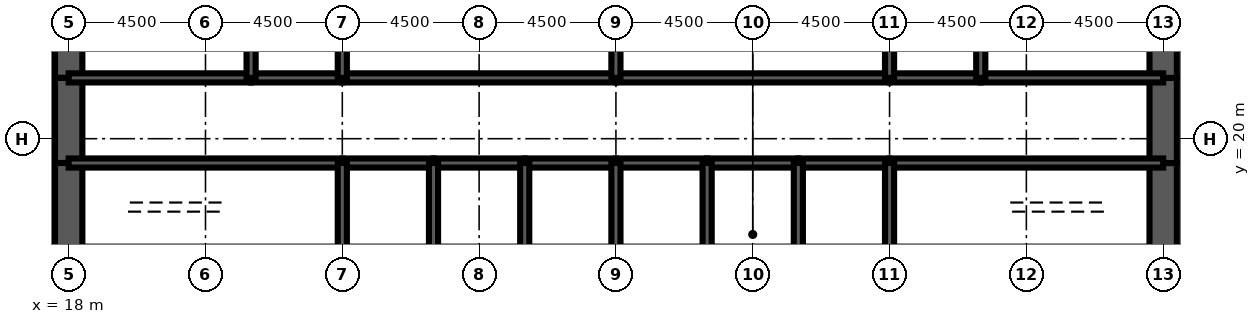
"""IFC4 building model, lengths in metres.
Left out: names, types, materials, properties, quantities, classifications, styles, units other than length and angle.
Written with IfcOpenShell. Run it as: python <this file> out.ifc"""

import sys

from ifc_helpers import new_model, si_unit, direction, frame, frame_2d, origin, place, context, subcontext, project, spatial, rectangle, extrude, element, fill, save


model = new_model("IFC4")
c1 = context("Model", 3, precision=1e-05, world=origin(), true_north=direction((0.0, 1.0)))
c2 = subcontext(c1, "Body", "Model", "MODEL_VIEW")
j1 = project(units=[si_unit("LENGTHUNIT", "METRE"), si_unit("PLANEANGLEUNIT", "RADIAN")], contexts=[c1])
p1 = place(None, origin())
s1 = spatial("IfcSite", under=j1, at=p1, CompositionType="ELEMENT")
p2 = place(p1, origin())
s2 = spatial("IfcBuilding", under=s1, at=p2, CompositionType="ELEMENT")
p3 = place(p2, frame((0.0, 0.0, 125.7)))
s3 = spatial("IfcBuildingStorey", under=s2, at=p3, CompositionType="ELEMENT", Elevation=125.7)
p4 = place(p3, frame((18.0, 26.0, 0.0), z_axis=(0.0, 0.0, 1.0), x_axis=(0.0, -1.0, 0.0)))
e1 = element("IfcWall", 1, at=p4, inside=s3, PredefinedType="SHEAR", context=c2, shape_type="SweptSolid", body=[
    extrude(rectangle(XDim=4.0, YDim=0.9, at=frame_2d((2.0, 0.0))), origin(), (0.0, 0.0, 1.0), 4.2),
])
p5 = place(p3, frame((18.0, 22.0, 0.0), z_axis=(0.0, 0.0, 1.0), x_axis=(0.0, -1.0, 0.0)))
e2 = element("IfcWall", 2, at=p5, inside=s3, PredefinedType="SHEAR", context=c2, shape_type="SweptSolid", body=[
    extrude(rectangle(XDim=2.8, YDim=0.9, at=frame_2d((1.4, 0.0))), origin(), (0.0, 0.0, 1.0), 4.2),
])
p6 = place(p5, frame((0.6, 0.0, 0.0)))
e3 = element("IfcOpeningElement", 3, at=p6, cuts=e2, PredefinedType="OPENING", context=c2, shape_type="SweptSolid", body=[
    extrude(rectangle(XDim=1.8, YDim=2.1, at=frame_2d((0.9, 1.05))), frame((0.0, 0.46, 0.0), z_axis=(0.0, -1.0, 0.0), x_axis=(1.0, 0.0, 0.0)), (0.0, 0.0, 1.0), 0.92),
])
for number, where, z_axis, x_axis in (
    (4, (18.0, 19.2, 0.0), (0.0, 0.0, 1.0), (0.0, -1.0, 0.0)),
    (5, (54.0, 16.0, 0.0), (0.0, 0.0, 1.0), (0.0, 1.0, 0.0)),
):
    element("IfcWall", number, at=place(p3, frame(where, z_axis=z_axis, x_axis=x_axis)), inside=s3, PredefinedType="SHEAR", context=c2, shape_type="SweptSolid", body=[
        extrude(rectangle(XDim=3.2, YDim=0.9, at=frame_2d((1.6, 0.0))), origin(), (0.0, 0.0, 1.0), 4.2),
    ])
p7 = place(p3, frame((54.0, 19.2, 0.0), z_axis=(0.0, 0.0, 1.0), x_axis=(0.0, 1.0, 0.0)))
e6 = element("IfcWall", 6, at=p7, inside=s3, PredefinedType="SHEAR", context=c2, shape_type="SweptSolid", body=[
    extrude(rectangle(XDim=2.8, YDim=0.9, at=frame_2d((1.4, 0.0))), origin(), (0.0, 0.0, 1.0), 4.2),
])
p8 = place(p7, frame((0.4, 0.0, 0.0)))
e7 = element("IfcOpeningElement", 7, at=p8, cuts=e6, PredefinedType="OPENING", context=c2, shape_type="SweptSolid", body=[
    extrude(rectangle(XDim=1.8, YDim=2.1, at=frame_2d((0.9, 1.05))), frame((0.0, 0.46, 0.0), z_axis=(0.0, -1.0, 0.0), x_axis=(1.0, 0.0, 0.0)), (0.0, 0.0, 1.0), 0.92),
])
p9 = place(p3, frame((54.0, 22.0, 0.0), z_axis=(0.0, 0.0, 1.0), x_axis=(0.0, 1.0, 0.0)))
e8 = element("IfcWall", 8, at=p9, inside=s3, PredefinedType="SHEAR", context=c2, shape_type="SweptSolid", body=[
    extrude(rectangle(XDim=4.0, YDim=0.9, at=frame_2d((2.0, 0.0))), origin(), (0.0, 0.0, 1.0), 4.2),
])
p10 = place(p3, frame((18.0, 19.2, 0.0), z_axis=(0.0, 0.0, 1.0), x_axis=(1.0, 0.0, 0.0)))
e9 = element("IfcWall", 9, at=p10, inside=s3, PredefinedType="SOLIDWALL", context=c2, shape_type="SweptSolid", body=[
    extrude(rectangle(XDim=9.0, YDim=0.3, at=frame_2d((4.5, 0.0))), origin(), (0.0, 0.0, 1.0), 4.2),
])
p11 = place(p10, frame((0.65, 0.0, 0.0)))
e10 = element("IfcOpeningElement", 10, at=p11, cuts=e9, PredefinedType="OPENING", context=c2, shape_type="SweptSolid", body=[
    extrude(rectangle(XDim=1.0, YDim=2.1, at=frame_2d((0.5, 1.05))), frame((0.0, 0.16, 0.0), z_axis=(0.0, -1.0, 0.0), x_axis=(1.0, 0.0, 0.0)), (0.0, 0.0, 1.0), 0.32),
])
p12 = place(p3, frame((27.0, 19.2, 0.0), z_axis=(0.0, 0.0, 1.0), x_axis=(1.0, 0.0, 0.0)))
e11 = element("IfcWall", 11, at=p12, inside=s3, PredefinedType="SOLIDWALL", context=c2, shape_type="SweptSolid", body=[
    extrude(rectangle(XDim=3.0, YDim=0.3, at=frame_2d((1.5, 0.0))), origin(), (0.0, 0.0, 1.0), 4.2),
])
p13 = place(p12, frame((0.95, 0.0, 0.0)))
e12 = element("IfcOpeningElement", 12, at=p13, cuts=e11, PredefinedType="OPENING", context=c2, shape_type="SweptSolid", body=[
    extrude(rectangle(XDim=1.1, YDim=2.2, at=frame_2d((0.55, 1.1))), frame((0.0, 0.16, 0.0), z_axis=(0.0, -1.0, 0.0), x_axis=(1.0, 0.0, 0.0)), (0.0, 0.0, 1.0), 0.32),
])
p14 = place(p3, frame((30.0, 19.2, 0.0), z_axis=(0.0, 0.0, 1.0), x_axis=(1.0, 0.0, 0.0)))
e13 = element("IfcWall", 13, at=p14, inside=s3, PredefinedType="SOLIDWALL", context=c2, shape_type="SweptSolid", body=[
    extrude(rectangle(XDim=3.0, YDim=0.3, at=frame_2d((1.5, 0.0))), origin(), (0.0, 0.0, 1.0), 4.2),
])
p15 = place(p14, frame((0.95, 0.0, 0.0)))
e14 = element("IfcOpeningElement", 14, at=p15, cuts=e13, PredefinedType="OPENING", context=c2, shape_type="SweptSolid", body=[
    extrude(rectangle(XDim=1.1, YDim=2.2, at=frame_2d((0.55, 1.1))), frame((0.0, 0.16, 0.0), z_axis=(0.0, -1.0, 0.0), x_axis=(1.0, 0.0, 0.0)), (0.0, 0.0, 1.0), 0.32),
])
p16 = place(p3, frame((33.0, 19.2, 0.0), z_axis=(0.0, 0.0, 1.0), x_axis=(1.0, 0.0, 0.0)))
e15 = element("IfcWall", 15, at=p16, inside=s3, PredefinedType="SOLIDWALL", context=c2, shape_type="SweptSolid", body=[
    extrude(rectangle(XDim=3.0, YDim=0.3, at=frame_2d((1.5, 0.0))), origin(), (0.0, 0.0, 1.0), 4.2),
])
p17 = place(p16, frame((0.95, 0.0, 0.0)))
e16 = element("IfcOpeningElement", 16, at=p17, cuts=e15, PredefinedType="OPENING", context=c2, shape_type="SweptSolid", body=[
    extrude(rectangle(XDim=1.1, YDim=2.2, at=frame_2d((0.55, 1.1))), frame((0.0, 0.16, 0.0), z_axis=(0.0, -1.0, 0.0), x_axis=(1.0, 0.0, 0.0)), (0.0, 0.0, 1.0), 0.32),
])
p18 = place(p3, frame((36.0, 19.2, 0.0), z_axis=(0.0, 0.0, 1.0), x_axis=(1.0, 0.0, 0.0)))
e17 = element("IfcWall", 17, at=p18, inside=s3, PredefinedType="SOLIDWALL", context=c2, shape_type="SweptSolid", body=[
    extrude(rectangle(XDim=3.0, YDim=0.3, at=frame_2d((1.5, 0.0))), origin(), (0.0, 0.0, 1.0), 4.2),
])
p19 = place(p18, frame((0.95, 0.0, 0.0)))
e18 = element("IfcOpeningElement", 18, at=p19, cuts=e17, PredefinedType="OPENING", context=c2, shape_type="SweptSolid", body=[
    extrude(rectangle(XDim=1.1, YDim=2.2, at=frame_2d((0.55, 1.1))), frame((0.0, 0.16, 0.0), z_axis=(0.0, -1.0, 0.0), x_axis=(1.0, 0.0, 0.0)), (0.0, 0.0, 1.0), 0.32),
])
p20 = place(p3, frame((39.0, 19.2, 0.0), z_axis=(0.0, 0.0, 1.0), x_axis=(1.0, 0.0, 0.0)))
e19 = element("IfcWall", 19, at=p20, inside=s3, PredefinedType="SOLIDWALL", context=c2, shape_type="SweptSolid", body=[
    extrude(rectangle(XDim=3.0, YDim=0.3, at=frame_2d((1.5, 0.0))), origin(), (0.0, 0.0, 1.0), 4.2),
])
p21 = place(p20, frame((1.0, 0.0, 0.0)))
e20 = element("IfcOpeningElement", 20, at=p21, cuts=e19, PredefinedType="OPENING", context=c2, shape_type="SweptSolid", body=[
    extrude(rectangle(XDim=1.0, YDim=2.1, at=frame_2d((0.5, 1.05))), frame((0.0, 0.16, 0.0), z_axis=(0.0, -1.0, 0.0), x_axis=(1.0, 0.0, 0.0)), (0.0, 0.0, 1.0), 0.32),
])
p22 = place(p3, frame((42.0, 19.2, 0.0), z_axis=(0.0, 0.0, 1.0), x_axis=(1.0, 0.0, 0.0)))
e21 = element("IfcWall", 21, at=p22, inside=s3, PredefinedType="SOLIDWALL", context=c2, shape_type="SweptSolid", body=[
    extrude(rectangle(XDim=3.0, YDim=0.3, at=frame_2d((1.5, 0.0))), origin(), (0.0, 0.0, 1.0), 4.2),
])
p23 = place(p3, frame((45.0, 19.2, 0.0), z_axis=(0.0, 0.0, 1.0), x_axis=(1.0, 0.0, 0.0)))
e22 = element("IfcWall", 22, at=p23, inside=s3, PredefinedType="SOLIDWALL", context=c2, shape_type="SweptSolid", body=[
    extrude(rectangle(XDim=9.0, YDim=0.3, at=frame_2d((4.5, 0.0))), origin(), (0.0, 0.0, 1.0), 4.2),
])
p24 = place(p23, frame((7.35, 0.0, 0.0)))
e23 = element("IfcOpeningElement", 23, at=p24, cuts=e22, PredefinedType="OPENING", context=c2, shape_type="SweptSolid", body=[
    extrude(rectangle(XDim=1.0, YDim=2.1, at=frame_2d((0.5, 1.05))), frame((0.0, 0.16, 0.0), z_axis=(0.0, -1.0, 0.0), x_axis=(1.0, 0.0, 0.0)), (0.0, 0.0, 1.0), 0.32),
])
p25 = place(p3, frame((18.0, 22.0, 0.0), z_axis=(0.0, 0.0, 1.0), x_axis=(1.0, 0.0, 0.0)))
e24 = element("IfcWall", 24, at=p25, inside=s3, PredefinedType="SOLIDWALL", context=c2, shape_type="SweptSolid", body=[
    extrude(rectangle(XDim=6.0, YDim=0.3, at=frame_2d((3.0, 0.0))), origin(), (0.0, 0.0, 1.0), 4.2),
])
p26 = place(p25, frame((4.4, 0.0, 0.0)))
e25 = element("IfcOpeningElement", 25, at=p26, cuts=e24, PredefinedType="OPENING", context=c2, shape_type="SweptSolid", body=[
    extrude(rectangle(XDim=1.0, YDim=2.1, at=frame_2d((0.5, 1.05))), frame((0.0, 0.16, 0.0), z_axis=(0.0, -1.0, 0.0), x_axis=(1.0, 0.0, 0.0)), (0.0, 0.0, 1.0), 0.32),
])
p27 = place(p25, frame((1.0, 0.0, 0.0)))
e26 = element("IfcOpeningElement", 26, at=p27, cuts=e24, PredefinedType="OPENING", context=c2, shape_type="SweptSolid", body=[
    extrude(rectangle(XDim=1.0, YDim=2.1, at=frame_2d((0.5, 1.05))), frame((0.0, 0.16, 0.0), z_axis=(0.0, -1.0, 0.0), x_axis=(1.0, 0.0, 0.0)), (0.0, 0.0, 1.0), 0.32),
])
p28 = place(p3, frame((24.0, 22.0, 0.0), z_axis=(0.0, 0.0, 1.0), x_axis=(1.0, 0.0, 0.0)))
e27 = element("IfcWall", 27, at=p28, inside=s3, PredefinedType="SOLIDWALL", context=c2, shape_type="SweptSolid", body=[
    extrude(rectangle(XDim=3.0, YDim=0.3, at=frame_2d((1.5, 0.0))), origin(), (0.0, 0.0, 1.0), 4.2),
])
p29 = place(p28, frame((1.0, 0.0, 0.0)))
e28 = element("IfcOpeningElement", 28, at=p29, cuts=e27, PredefinedType="OPENING", context=c2, shape_type="SweptSolid", body=[
    extrude(rectangle(XDim=1.0, YDim=2.1, at=frame_2d((0.5, 1.05))), frame((0.0, 0.16, 0.0), z_axis=(0.0, -1.0, 0.0), x_axis=(1.0, 0.0, 0.0)), (0.0, 0.0, 1.0), 0.32),
])
p30 = place(p3, frame((27.0, 22.0, 0.0), z_axis=(0.0, 0.0, 1.0), x_axis=(1.0, 0.0, 0.0)))
e29 = element("IfcWall", 29, at=p30, inside=s3, PredefinedType="SOLIDWALL", context=c2, shape_type="SweptSolid", body=[
    extrude(rectangle(XDim=9.0, YDim=0.3, at=frame_2d((4.5, 0.0))), origin(), (0.0, 0.0, 1.0), 4.2),
])
p31 = place(p30, frame((4.0, 0.0, 0.0)))
e30 = element("IfcOpeningElement", 30, at=p31, cuts=e29, PredefinedType="OPENING", context=c2, shape_type="SweptSolid", body=[
    extrude(rectangle(XDim=1.0, YDim=2.1, at=frame_2d((0.5, 1.05))), frame((0.0, 0.16, 0.0), z_axis=(0.0, -1.0, 0.0), x_axis=(1.0, 0.0, 0.0)), (0.0, 0.0, 1.0), 0.32),
])
p32 = place(p3, frame((36.0, 22.0, 0.0), z_axis=(0.0, 0.0, 1.0), x_axis=(1.0, 0.0, 0.0)))
e31 = element("IfcWall", 31, at=p32, inside=s3, PredefinedType="SOLIDWALL", context=c2, shape_type="SweptSolid", body=[
    extrude(rectangle(XDim=9.0, YDim=0.3, at=frame_2d((4.5, 0.0))), origin(), (0.0, 0.0, 1.0), 4.2),
])
p33 = place(p32, frame((4.0, 0.0, 0.0)))
e32 = element("IfcOpeningElement", 32, at=p33, cuts=e31, PredefinedType="OPENING", context=c2, shape_type="SweptSolid", body=[
    extrude(rectangle(XDim=1.0, YDim=2.1, at=frame_2d((0.5, 1.05))), frame((0.0, 0.16, 0.0), z_axis=(0.0, -1.0, 0.0), x_axis=(1.0, 0.0, 0.0)), (0.0, 0.0, 1.0), 0.32),
])
p34 = place(p3, frame((45.0, 22.0, 0.0), z_axis=(0.0, 0.0, 1.0), x_axis=(1.0, 0.0, 0.0)))
e33 = element("IfcWall", 33, at=p34, inside=s3, PredefinedType="SOLIDWALL", context=c2, shape_type="SweptSolid", body=[
    extrude(rectangle(XDim=3.0, YDim=0.3, at=frame_2d((1.5, 0.0))), origin(), (0.0, 0.0, 1.0), 4.2),
])
p35 = place(p34, frame((1.0, 0.0, 0.0)))
e34 = element("IfcOpeningElement", 34, at=p35, cuts=e33, PredefinedType="OPENING", context=c2, shape_type="SweptSolid", body=[
    extrude(rectangle(XDim=1.0, YDim=2.1, at=frame_2d((0.5, 1.05))), frame((0.0, 0.16, 0.0), z_axis=(0.0, -1.0, 0.0), x_axis=(1.0, 0.0, 0.0)), (0.0, 0.0, 1.0), 0.32),
])
p36 = place(p3, frame((48.0, 22.0, 0.0), z_axis=(0.0, 0.0, 1.0), x_axis=(1.0, 0.0, 0.0)))
e35 = element("IfcWall", 35, at=p36, inside=s3, PredefinedType="SOLIDWALL", context=c2, shape_type="SweptSolid", body=[
    extrude(rectangle(XDim=6.0, YDim=0.3, at=frame_2d((3.0, 0.0))), origin(), (0.0, 0.0, 1.0), 4.2),
])
p37 = place(p36, frame((2.0, 0.0, 0.0)))
e36 = element("IfcOpeningElement", 36, at=p37, cuts=e35, PredefinedType="OPENING", context=c2, shape_type="SweptSolid", body=[
    extrude(rectangle(XDim=1.0, YDim=2.1, at=frame_2d((0.5, 1.05))), frame((0.0, 0.16, 0.0), z_axis=(0.0, -1.0, 0.0), x_axis=(1.0, 0.0, 0.0)), (0.0, 0.0, 1.0), 0.32),
])
p38 = place(p36, frame((4.3, 0.0, 0.0)))
e37 = element("IfcOpeningElement", 37, at=p38, cuts=e35, PredefinedType="OPENING", context=c2, shape_type="SweptSolid", body=[
    extrude(rectangle(XDim=1.0, YDim=2.1, at=frame_2d((0.5, 1.05))), frame((0.0, 0.16, 0.0), z_axis=(0.0, -1.0, 0.0), x_axis=(1.0, 0.0, 0.0)), (0.0, 0.0, 1.0), 0.32),
])
for number, where, z_axis, x_axis in (
    (38, (27.0, 16.0, 0.0), (0.0, 0.0, 1.0), (0.0, 1.0, 0.0)),
    (39, (30.0, 16.0, 0.0), (0.0, 0.0, 1.0), (0.0, 1.0, 0.0)),
    (40, (33.0, 16.0, 0.0), (0.0, 0.0, 1.0), (0.0, 1.0, 0.0)),
    (41, (36.0, 16.0, 0.0), (0.0, 0.0, 1.0), (0.0, 1.0, 0.0)),
    (42, (39.0, 16.0, 0.0), (0.0, 0.0, 1.0), (0.0, 1.0, 0.0)),
    (43, (42.0, 16.0, 0.0), (0.0, 0.0, 1.0), (0.0, 1.0, 0.0)),
    (44, (45.0, 16.0, 0.0), (0.0, 0.0, 1.0), (0.0, 1.0, 0.0)),
):
    element("IfcWall", number, at=place(p3, frame(where, z_axis=z_axis, x_axis=x_axis)), inside=s3, PredefinedType="SOLIDWALL", context=c2, shape_type="SweptSolid", body=[
        extrude(rectangle(XDim=3.2, YDim=0.3, at=frame_2d((1.6, 0.0))), origin(), (0.0, 0.0, 1.0), 4.2),
    ])
for number, where, z_axis, x_axis in (
    (45, (24.0, 22.0, 0.0), (0.0, 0.0, 1.0), (0.0, 1.0, 0.0)),
    (46, (27.0, 22.0, 0.0), (0.0, 0.0, 1.0), (0.0, 1.0, 0.0)),
    (47, (36.0, 22.0, 0.0), (0.0, 0.0, 1.0), (0.0, 1.0, 0.0)),
    (48, (45.0, 22.0, 0.0), (0.0, 0.0, 1.0), (0.0, 1.0, 0.0)),
    (49, (48.0, 22.0, 0.0), (0.0, 0.0, 1.0), (0.0, 1.0, 0.0)),
):
    element("IfcWall", number, at=place(p3, frame(where, z_axis=z_axis, x_axis=x_axis)), inside=s3, PredefinedType="SOLIDWALL", context=c2, shape_type="SweptSolid", body=[
        extrude(rectangle(XDim=4.0, YDim=0.3, at=frame_2d((2.0, 0.0))), origin(), (0.0, 0.0, 1.0), 4.2),
    ])
p39 = place(p3, frame((39.15, 17.4, 0.0), z_axis=(0.0, 0.0, 1.0), x_axis=(1.0, 0.0, 0.0)))
e50 = element("IfcWall", 50, at=p39, inside=s3, PredefinedType="SOLIDWALL", context=c2, shape_type="SweptSolid", body=[
    extrude(rectangle(XDim=2.7, YDim=0.3, at=frame_2d((1.35, 0.0))), origin(), (0.0, 0.0, 1.0), 4.04),
])
p40 = place(p39, frame((0.85, 0.0, 0.0)))
e51 = element("IfcOpeningElement", 51, at=p40, cuts=e50, PredefinedType="OPENING", context=c2, shape_type="SweptSolid", body=[
    extrude(rectangle(XDim=1.0, YDim=2.1, at=frame_2d((0.5, 1.05))), frame((0.0, 0.16, 0.0), z_axis=(0.0, -1.0, 0.0), x_axis=(1.0, 0.0, 0.0)), (0.0, 0.0, 1.0), 0.32),
])
p41 = place(p3, frame((42.5, 22.15, 0.0), z_axis=(0.0, 0.0, 1.0), x_axis=(0.0, 1.0, 0.0)))
e52 = element("IfcWall", 52, at=p41, inside=s3, PredefinedType="PARTITIONING", context=c2, shape_type="SweptSolid", body=[
    extrude(rectangle(XDim=3.7, YDim=0.15, at=frame_2d((1.85, 0.0))), origin(), (0.0, 0.0, 1.0), 3.0),
])
p42 = place(p41, frame((2.2, 0.0, 0.0)))
e53 = element("IfcOpeningElement", 53, at=p42, cuts=e52, PredefinedType="OPENING", context=c2, shape_type="SweptSolid", body=[
    extrude(rectangle(XDim=1.0, YDim=2.1, at=frame_2d((0.5, 1.05))), frame((0.0, 0.085, 0.0), z_axis=(0.0, -1.0, 0.0), x_axis=(1.0, 0.0, 0.0)), (0.0, 0.0, 1.0), 0.17),
])
for number, where, z_axis, x_axis in (
    (54, (20.625, 22.15, 0.0), (0.0, 0.0, 1.0), (0.0, 1.0, 0.0)),
    (55, (51.975, 22.15, 0.0), (0.0, 0.0, 1.0), (0.0, 1.0, 0.0)),
):
    element("IfcWall", number, at=place(p3, frame(where, z_axis=z_axis, x_axis=x_axis)), inside=s3, PredefinedType="PARTITIONING", context=c2, shape_type="SweptSolid", body=[
        extrude(rectangle(XDim=3.7, YDim=0.15, at=frame_2d((1.85, 0.0))), origin(), (0.0, 0.0, 1.0), 3.0),
    ])
p43 = place(p40, origin())
e56 = element("IfcDoor", 56, at=p43, inside=s3, OperationType="SINGLE_SWING_LEFT", PredefinedType="DOOR", context=c2, shape_type="SweptSolid", body=[
    extrude(rectangle(XDim=1.0, YDim=2.1, at=frame_2d((0.5, 1.05))), frame((0.0, 0.025, 0.0), z_axis=(0.0, -1.0, 0.0), x_axis=(1.0, 0.0, 0.0)), (0.0, 0.0, 1.0), 0.05),
])
fill(e51, e56)
p44 = place(p13, origin())
e57 = element("IfcDoor", 57, at=p44, inside=s3, OperationType="DOUBLE_DOOR_SLIDING", PredefinedType="USERDEFINED", context=c2, shape_type="SweptSolid", body=[
    extrude(rectangle(XDim=1.1, YDim=2.2, at=frame_2d((0.55, 1.1))), frame((0.0, 0.025, 0.0), z_axis=(0.0, -1.0, 0.0), x_axis=(1.0, 0.0, 0.0)), (0.0, 0.0, 1.0), 0.05),
])
fill(e12, e57)
p45 = place(p15, origin())
e58 = element("IfcDoor", 58, at=p45, inside=s3, OperationType="DOUBLE_DOOR_SLIDING", PredefinedType="USERDEFINED", context=c2, shape_type="SweptSolid", body=[
    extrude(rectangle(XDim=1.1, YDim=2.2, at=frame_2d((0.55, 1.1))), frame((0.0, 0.025, 0.0), z_axis=(0.0, -1.0, 0.0), x_axis=(1.0, 0.0, 0.0)), (0.0, 0.0, 1.0), 0.05),
])
fill(e14, e58)
p46 = place(p17, origin())
e59 = element("IfcDoor", 59, at=p46, inside=s3, OperationType="DOUBLE_DOOR_SLIDING", PredefinedType="USERDEFINED", context=c2, shape_type="SweptSolid", body=[
    extrude(rectangle(XDim=1.1, YDim=2.2, at=frame_2d((0.55, 1.1))), frame((0.0, 0.025, 0.0), z_axis=(0.0, -1.0, 0.0), x_axis=(1.0, 0.0, 0.0)), (0.0, 0.0, 1.0), 0.05),
])
fill(e16, e59)
p47 = place(p19, origin())
e60 = element("IfcDoor", 60, at=p47, inside=s3, OperationType="DOUBLE_DOOR_SLIDING", PredefinedType="USERDEFINED", context=c2, shape_type="SweptSolid", body=[
    extrude(rectangle(XDim=1.1, YDim=2.2, at=frame_2d((0.55, 1.1))), frame((0.0, 0.025, 0.0), z_axis=(0.0, -1.0, 0.0), x_axis=(1.0, 0.0, 0.0)), (0.0, 0.0, 1.0), 0.05),
])
fill(e18, e60)
p48 = place(p11, origin())
e61 = element("IfcDoor", 61, at=p48, inside=s3, OperationType="SINGLE_SWING_LEFT", PredefinedType="DOOR", context=c2, shape_type="SweptSolid", body=[
    extrude(rectangle(XDim=1.0, YDim=2.1, at=frame_2d((0.5, 1.05))), frame((0.0, 0.025, 0.0), z_axis=(0.0, -1.0, 0.0), x_axis=(1.0, 0.0, 0.0)), (0.0, 0.0, 1.0), 0.05),
])
fill(e10, e61)
p49 = place(p24, origin())
e62 = element("IfcDoor", 62, at=p49, inside=s3, OperationType="SINGLE_SWING_RIGHT", PredefinedType="DOOR", context=c2, shape_type="SweptSolid", body=[
    extrude(rectangle(XDim=1.0, YDim=2.1, at=frame_2d((0.5, 1.05))), frame((0.0, 0.025, 0.0), z_axis=(0.0, -1.0, 0.0), x_axis=(1.0, 0.0, 0.0)), (0.0, 0.0, 1.0), 0.05),
])
fill(e23, e62)
p50 = place(p6, origin())
e63 = element("IfcDoor", 63, at=p50, inside=s3, OperationType="SINGLE_SWING_LEFT", PredefinedType="DOOR", context=c2, shape_type="SweptSolid", body=[
    extrude(rectangle(XDim=1.8, YDim=2.1, at=frame_2d((0.9, 1.05))), frame((0.0, 0.45, 0.0), z_axis=(0.0, -1.0, 0.0), x_axis=(1.0, 0.0, 0.0)), (0.0, 0.0, 1.0), 0.899),
])
fill(e3, e63)
p51 = place(p8, origin())
e64 = element("IfcDoor", 64, at=p51, inside=s3, OperationType="SINGLE_SWING_LEFT", PredefinedType="DOOR", context=c2, shape_type="SweptSolid", body=[
    extrude(rectangle(XDim=1.8, YDim=2.1, at=frame_2d((0.9, 1.05))), frame((0.0, 0.45, 0.0), z_axis=(0.0, -1.0, 0.0), x_axis=(1.0, 0.0, 0.0)), (0.0, 0.0, 1.0), 0.899),
])
fill(e7, e64)
p52 = place(p26, origin())
e65 = element("IfcDoor", 65, at=p52, inside=s3, OperationType="SINGLE_SWING_RIGHT", PredefinedType="DOOR", context=c2, shape_type="SweptSolid", body=[
    extrude(rectangle(XDim=1.0, YDim=2.1, at=frame_2d((0.5, 1.05))), frame((0.0, 0.025, 0.0), z_axis=(0.0, -1.0, 0.0), x_axis=(1.0, 0.0, 0.0)), (0.0, 0.0, 1.0), 0.05),
])
fill(e25, e65)
p53 = place(p29, origin())
e66 = element("IfcDoor", 66, at=p53, inside=s3, OperationType="SINGLE_SWING_LEFT", PredefinedType="DOOR", context=c2, shape_type="SweptSolid", body=[
    extrude(rectangle(XDim=1.0, YDim=2.1, at=frame_2d((0.5, 1.05))), frame((0.0, 0.025, 0.0), z_axis=(0.0, -1.0, 0.0), x_axis=(1.0, 0.0, 0.0)), (0.0, 0.0, 1.0), 0.05),
])
fill(e28, e66)
p54 = place(p31, origin())
e67 = element("IfcDoor", 67, at=p54, inside=s3, OperationType="SINGLE_SWING_LEFT", PredefinedType="DOOR", context=c2, shape_type="SweptSolid", body=[
    extrude(rectangle(XDim=1.0, YDim=2.1, at=frame_2d((0.5, 1.05))), frame((0.0, 0.025, 0.0), z_axis=(0.0, -1.0, 0.0), x_axis=(1.0, 0.0, 0.0)), (0.0, 0.0, 1.0), 0.05),
])
fill(e30, e67)
p55 = place(p33, origin())
e68 = element("IfcDoor", 68, at=p55, inside=s3, OperationType="SINGLE_SWING_LEFT", PredefinedType="DOOR", context=c2, shape_type="SweptSolid", body=[
    extrude(rectangle(XDim=1.0, YDim=2.1, at=frame_2d((0.5, 1.05))), frame((0.0, 0.025, 0.0), z_axis=(0.0, -1.0, 0.0), x_axis=(1.0, 0.0, 0.0)), (0.0, 0.0, 1.0), 0.05),
])
fill(e32, e68)
p56 = place(p35, origin())
e69 = element("IfcDoor", 69, at=p56, inside=s3, OperationType="SINGLE_SWING_LEFT", PredefinedType="DOOR", context=c2, shape_type="SweptSolid", body=[
    extrude(rectangle(XDim=1.0, YDim=2.1, at=frame_2d((0.5, 1.05))), frame((0.0, 0.025, 0.0), z_axis=(0.0, -1.0, 0.0), x_axis=(1.0, 0.0, 0.0)), (0.0, 0.0, 1.0), 0.05),
])
fill(e34, e69)
p57 = place(p37, origin())
e70 = element("IfcDoor", 70, at=p57, inside=s3, OperationType="SINGLE_SWING_LEFT", PredefinedType="DOOR", context=c2, shape_type="SweptSolid", body=[
    extrude(rectangle(XDim=1.0, YDim=2.1, at=frame_2d((0.5, 1.05))), frame((0.0, 0.025, 0.0), z_axis=(0.0, -1.0, 0.0), x_axis=(1.0, 0.0, 0.0)), (0.0, 0.0, 1.0), 0.05),
])
fill(e36, e70)
p58 = place(p27, origin())
e71 = element("IfcDoor", 71, at=p58, inside=s3, OperationType="SINGLE_SWING_LEFT", PredefinedType="DOOR", context=c2, shape_type="SweptSolid", body=[
    extrude(rectangle(XDim=1.0, YDim=2.1, at=frame_2d((0.5, 1.05))), frame((0.0, 0.025, 0.0), z_axis=(0.0, -1.0, 0.0), x_axis=(1.0, 0.0, 0.0)), (0.0, 0.0, 1.0), 0.05),
])
fill(e26, e71)
p59 = place(p38, origin())
e72 = element("IfcDoor", 72, at=p59, inside=s3, OperationType="SINGLE_SWING_RIGHT", PredefinedType="DOOR", context=c2, shape_type="SweptSolid", body=[
    extrude(rectangle(XDim=1.0, YDim=2.1, at=frame_2d((0.5, 1.05))), frame((0.0, 0.025, 0.0), z_axis=(0.0, -1.0, 0.0), x_axis=(1.0, 0.0, 0.0)), (0.0, 0.0, 1.0), 0.05),
])
fill(e37, e72)
p60 = place(p21, origin())
e73 = element("IfcDoor", 73, at=p60, inside=s3, OperationType="SINGLE_SWING_LEFT", PredefinedType="DOOR", context=c2, shape_type="SweptSolid", body=[
    extrude(rectangle(XDim=1.0, YDim=2.1, at=frame_2d((0.5, 1.05))), frame((0.0, 0.025, 0.0), z_axis=(0.0, -1.0, 0.0), x_axis=(1.0, 0.0, 0.0)), (0.0, 0.0, 1.0), 0.05),
])
fill(e20, e73)
save(model, sys.argv[1])
